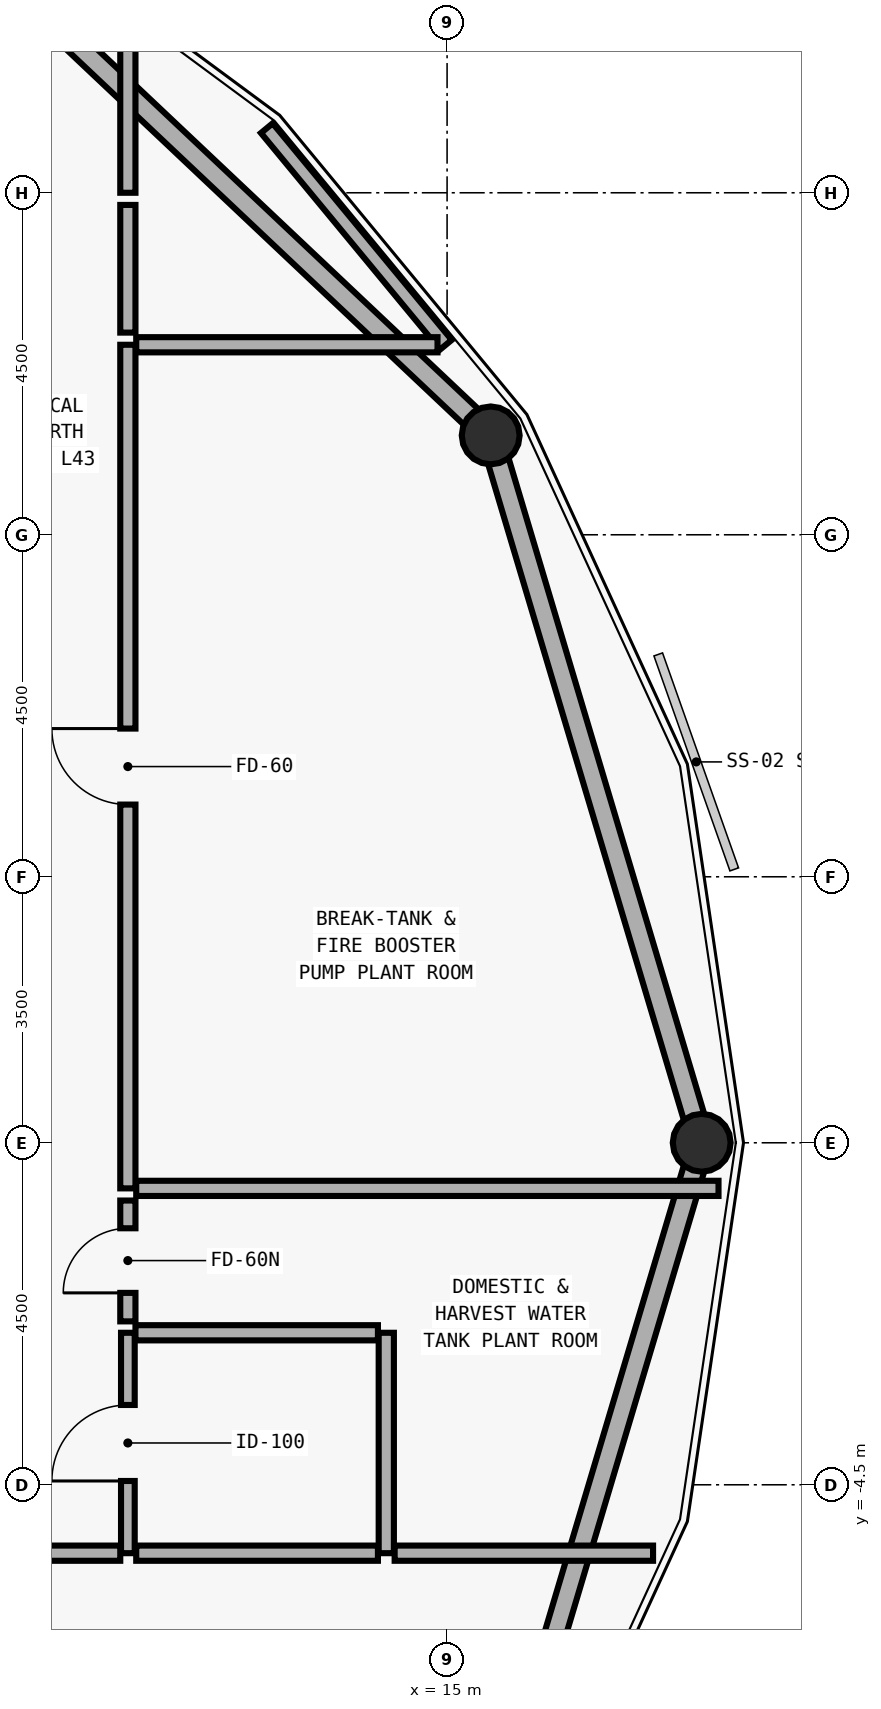
"""IFC4 building model, lengths in metres.
Left out: names, types, materials, properties, quantities, classifications, styles, units other than length and angle.
Written with IfcOpenShell. Run it as: python <this file> out.ifc"""

import sys

from ifc_helpers import new_model, si_unit, direction, frame, frame_2d, origin, origin_2d, place, context, subcontext, project, spatial, rectangle, hollow_circle, extrude, element, fill, save


model = new_model("IFC4")
c1 = context("Model", 3, precision=1e-05, world=origin(), true_north=direction((0.0, 1.0)))
c2 = subcontext(c1, "Body", "Model", "MODEL_VIEW")
j1 = project(units=[si_unit("LENGTHUNIT", "METRE"), si_unit("PLANEANGLEUNIT", "RADIAN")], contexts=[c1])
p1 = place(None, origin())
s1 = spatial("IfcSite", under=j1, at=p1, CompositionType="ELEMENT")
p2 = place(p1, origin())
s2 = spatial("IfcBuilding", under=s1, at=p2, CompositionType="ELEMENT")
p3 = place(p2, frame((0.0, 0.0, 173.4)))
s3 = spatial("IfcBuildingStorey", under=s2, at=p3, CompositionType="ELEMENT", Elevation=173.4)
for number, where, z_axis, x_axis in (
    (1, (18.35, 0.0, 0.0), (0.0, 0.0, 1.0), (1.0, 0.0, 0.0)),
    (2, (15.574, 9.308, 0.0), (0.0, 0.0, 1.0), (1.0, 0.0, 0.0)),
):
    element("IfcColumn", number, at=place(p3, frame(where, z_axis=z_axis, x_axis=x_axis)), inside=s3, PredefinedType="COLUMN", context=c2, shape_type="SweptSolid", body=[
        extrude(hollow_circle(Radius=0.381, WallThickness=0.028, at=origin_2d()), origin(), (0.0, 0.0, 1.0), 4.95),
    ])
p4 = place(p3, frame((15.67, 8.986, 0.0), z_axis=(0.0, 0.0, 1.0), x_axis=(0.285841231568, -0.958276990403, 0.0)))
e3 = element("IfcWall", 3, at=p4, inside=s3, PredefinedType="SOLIDWALL", context=c2, shape_type="SweptSolid", body=[
    extrude(rectangle(XDim=9.041, YDim=0.28, at=frame_2d((4.521, 0.0))), origin(), (0.0, 0.0, 1.0), 3.1),
])
p5 = place(p3, frame((8.602, 15.89, 0.0), z_axis=(0.0, 0.0, 1.0), x_axis=(0.727093640033, -0.686538300915, 0.0)))
e4 = element("IfcWall", 4, at=p5, inside=s3, PredefinedType="SOLIDWALL", context=c2, shape_type="SweptSolid", body=[
    extrude(rectangle(XDim=9.253, YDim=0.28, at=frame_2d((4.626, 0.0))), origin(), (0.0, 0.0, 1.0), 3.1),
])
p6 = place(p3, frame((18.254, -0.322, 0.0), z_axis=(0.0, 0.0, 1.0), x_axis=(-0.285841231568, -0.958276990403, 0.0)))
e5 = element("IfcWall", 5, at=p6, inside=s3, PredefinedType="SOLIDWALL", context=c2, shape_type="SweptSolid", body=[
    extrude(rectangle(XDim=9.041, YDim=0.28, at=frame_2d((4.521, 0.0))), origin(), (0.0, 0.0, 1.0), 3.1),
])
p7 = place(p3, frame((10.8, -5.4, 0.0), z_axis=(0.0, 0.0, 1.0), x_axis=(0.0, 1.0, 0.0)))
e6 = element("IfcWall", 6, at=p7, inside=s3, PredefinedType="PLUMBINGWALL", context=c2, shape_type="SweptSolid", body=[
    extrude(rectangle(XDim=2.9, YDim=0.18, at=frame_2d((1.45, 0.0))), origin(), (0.0, 0.0, 1.0), 4.95),
])
p8 = place(p7, frame((0.95, 0.0, 0.0)))
e7 = element("IfcOpeningElement", 7, at=p8, cuts=e6, PredefinedType="OPENING", context=c2, shape_type="SweptSolid", body=[
    extrude(rectangle(XDim=1.0, YDim=2.1, at=frame_2d((0.5, 1.05))), frame((0.0, 0.1, 0.0), z_axis=(0.0, -1.0, 0.0), x_axis=(1.0, 0.0, 0.0)), (0.0, 0.0, 1.0), 0.2),
])
p9 = place(p3, frame((10.8, -0.6, 0.0), z_axis=(0.0, 0.0, 1.0), x_axis=(0.0, 1.0, 0.0)))
e8 = element("IfcWall", 8, at=p9, inside=s3, PredefinedType="MOVABLE", context=c2, shape_type="SweptSolid", body=[
    extrude(rectangle(XDim=11.1, YDim=0.2, at=frame_2d((5.55, 0.0))), origin(), (0.0, 0.0, 1.0), 4.95),
])
p10 = place(p9, frame((5.05, 0.0, 0.0)))
e9 = element("IfcOpeningElement", 9, at=p10, cuts=e8, PredefinedType="OPENING", context=c2, shape_type="SweptSolid", body=[
    extrude(rectangle(XDim=1.0, YDim=2.1, at=frame_2d((0.5, 1.05))), frame((0.0, 0.11, 0.0), z_axis=(0.0, -1.0, 0.0), x_axis=(1.0, 0.0, 0.0)), (0.0, 0.0, 1.0), 0.22),
])
p11 = place(p3, frame((10.8, -2.35, 0.0), z_axis=(0.0, 0.0, 1.0), x_axis=(0.0, 1.0, 0.0)))
e10 = element("IfcWall", 10, at=p11, inside=s3, PredefinedType="MOVABLE", context=c2, shape_type="SweptSolid", body=[
    extrude(rectangle(XDim=1.59, YDim=0.2, at=frame_2d((0.795, 0.0))), origin(), (0.0, 0.0, 1.0), 4.95),
])
p12 = place(p11, frame((0.375, 0.0, 0.0)))
e11 = element("IfcOpeningElement", 11, at=p12, cuts=e10, PredefinedType="OPENING", context=c2, shape_type="SweptSolid", body=[
    extrude(rectangle(XDim=0.85, YDim=2.1, at=frame_2d((0.425, 1.05))), frame((0.0, 0.11, 0.0), z_axis=(0.0, -1.0, 0.0), x_axis=(1.0, 0.0, 0.0)), (0.0, 0.0, 1.0), 0.22),
])
p13 = place(p3, frame((10.8, 12.5, 0.0), z_axis=(0.0, 0.0, 1.0), x_axis=(0.0, 1.0, 0.0)))
e12 = element("IfcWall", 12, at=p13, inside=s3, PredefinedType="MOVABLE", context=c2, shape_type="SweptSolid", body=[
    extrude(rectangle(XDim=2.09, YDim=0.2, at=frame_2d((1.045, 0.0))), origin(), (0.0, 0.0, 1.0), 4.95),
])
p14 = place(p3, frame((10.8, 10.66, 0.0), z_axis=(0.0, 0.0, 1.0), x_axis=(0.0, 1.0, 0.0)))
e13 = element("IfcWall", 13, at=p14, inside=s3, PredefinedType="MOVABLE", context=c2, shape_type="SweptSolid", body=[
    extrude(rectangle(XDim=1.68, YDim=0.2, at=frame_2d((0.84, 0.0))), origin(), (0.0, 0.0, 1.0), 4.95),
])
p15 = place(p3, frame((8.11, -5.4, 0.0), z_axis=(0.0, 0.0, 1.0), x_axis=(1.0, 0.0, 0.0)))
e14 = element("IfcWall", 14, at=p15, inside=s3, PredefinedType="MOVABLE", context=c2, shape_type="SweptSolid", body=[
    extrude(rectangle(XDim=2.59, YDim=0.2, at=frame_2d((1.295, 0.0))), origin(), (0.0, 0.0, 1.0), 4.95),
])
p16 = place(p3, frame((14.2, -2.5, 0.0), z_axis=(0.0, 0.0, 1.0), x_axis=(0.0, -1.0, 0.0)))
e15 = element("IfcWall", 15, at=p16, inside=s3, PredefinedType="MOVABLE", context=c2, shape_type="SweptSolid", body=[
    extrude(rectangle(XDim=2.9, YDim=0.2, at=frame_2d((1.45, 0.0))), origin(), (0.0, 0.0, 1.0), 4.95),
])
p17 = place(p3, frame((10.9, -2.5, 0.0), z_axis=(0.0, 0.0, 1.0), x_axis=(1.0, 0.0, 0.0)))
e16 = element("IfcWall", 16, at=p17, inside=s3, PredefinedType="MOVABLE", context=c2, shape_type="SweptSolid", body=[
    extrude(rectangle(XDim=3.19, YDim=0.2, at=frame_2d((1.595, 0.0))), origin(), (0.0, 0.0, 1.0), 4.95),
])
p18 = place(p3, frame((14.09, -5.4, 0.0), z_axis=(0.0, 0.0, 1.0), x_axis=(-1.0, 0.0, 0.0)))
e17 = element("IfcWall", 17, at=p18, inside=s3, PredefinedType="MOVABLE", context=c2, shape_type="SweptSolid", body=[
    extrude(rectangle(XDim=3.18, YDim=0.2, at=frame_2d((1.59, 0.0))), origin(), (0.0, 0.0, 1.0), 4.95),
])
p19 = place(p3, frame((12.628, 13.35, 0.0), z_axis=(0.0, 0.0, 1.0), x_axis=(0.637127111225, -0.770758745745, 0.0)))
e18 = element("IfcWall", 18, at=p19, inside=s3, PredefinedType="MOVABLE", context=c2, shape_type="SweptSolid", body=[
    extrude(rectangle(XDim=3.698, YDim=0.2, at=frame_2d((1.849, 0.0))), origin(), (0.0, 0.0, 1.0), 4.95),
])
p20 = place(p3, frame((14.874, 10.5, 0.0), z_axis=(0.0, 0.0, 1.0), x_axis=(-1.0, 0.0, 0.0)))
e19 = element("IfcWall", 19, at=p20, inside=s3, PredefinedType="MOVABLE", context=c2, shape_type="SweptSolid", body=[
    extrude(rectangle(XDim=3.964, YDim=0.2, at=frame_2d((1.982, 0.0))), origin(), (0.0, 0.0, 1.0), 4.95),
])
p21 = place(p3, frame((18.571, -0.6, 0.0), z_axis=(0.0, 0.0, 1.0), x_axis=(-1.0, 0.0, 0.0)))
e20 = element("IfcWall", 20, at=p21, inside=s3, PredefinedType="MOVABLE", context=c2, shape_type="SweptSolid", body=[
    extrude(rectangle(XDim=7.661, YDim=0.2, at=frame_2d((3.831, 0.0))), origin(), (0.0, 0.0, 1.0), 3.432),
])
p22 = place(p3, frame((17.71, -5.4, 0.0), z_axis=(0.0, 0.0, 1.0), x_axis=(-1.0, 0.0, 0.0)))
e21 = element("IfcWall", 21, at=p22, inside=s3, PredefinedType="MOVABLE", context=c2, shape_type="SweptSolid", body=[
    extrude(rectangle(XDim=3.4, YDim=0.2, at=frame_2d((1.7, 0.0))), origin(), (0.0, 0.0, 1.0), 4.95),
])
p23 = place(p8, origin())
e22 = element("IfcDoor", 22, at=p23, inside=s3, OperationType="SINGLE_SWING_LEFT", PredefinedType="DOOR", context=c2, shape_type="SweptSolid", body=[
    extrude(rectangle(XDim=1.0, YDim=2.1, at=frame_2d((0.5, 1.05))), frame((0.0, 0.025, 0.0), z_axis=(0.0, -1.0, 0.0), x_axis=(1.0, 0.0, 0.0)), (0.0, 0.0, 1.0), 0.05),
])
fill(e7, e22)
p24 = place(p10, origin())
e23 = element("IfcDoor", 23, at=p24, inside=s3, OperationType="SINGLE_SWING_RIGHT", PredefinedType="DOOR", context=c2, shape_type="SweptSolid", body=[
    extrude(rectangle(XDim=1.0, YDim=2.1, at=frame_2d((0.5, 1.05))), frame((0.0, 0.025, 0.0), z_axis=(0.0, -1.0, 0.0), x_axis=(1.0, 0.0, 0.0)), (0.0, 0.0, 1.0), 0.05),
])
fill(e9, e23)
p25 = place(p12, origin())
e24 = element("IfcDoor", 24, at=p25, inside=s3, OperationType="SINGLE_SWING_LEFT", PredefinedType="DOOR", context=c2, shape_type="SweptSolid", body=[
    extrude(rectangle(XDim=0.85, YDim=2.1, at=frame_2d((0.425, 1.05))), frame((0.0, 0.025, 0.0), z_axis=(0.0, -1.0, 0.0), x_axis=(1.0, 0.0, 0.0)), (0.0, 0.0, 1.0), 0.05),
])
fill(e11, e24)
save(model, sys.argv[1])
